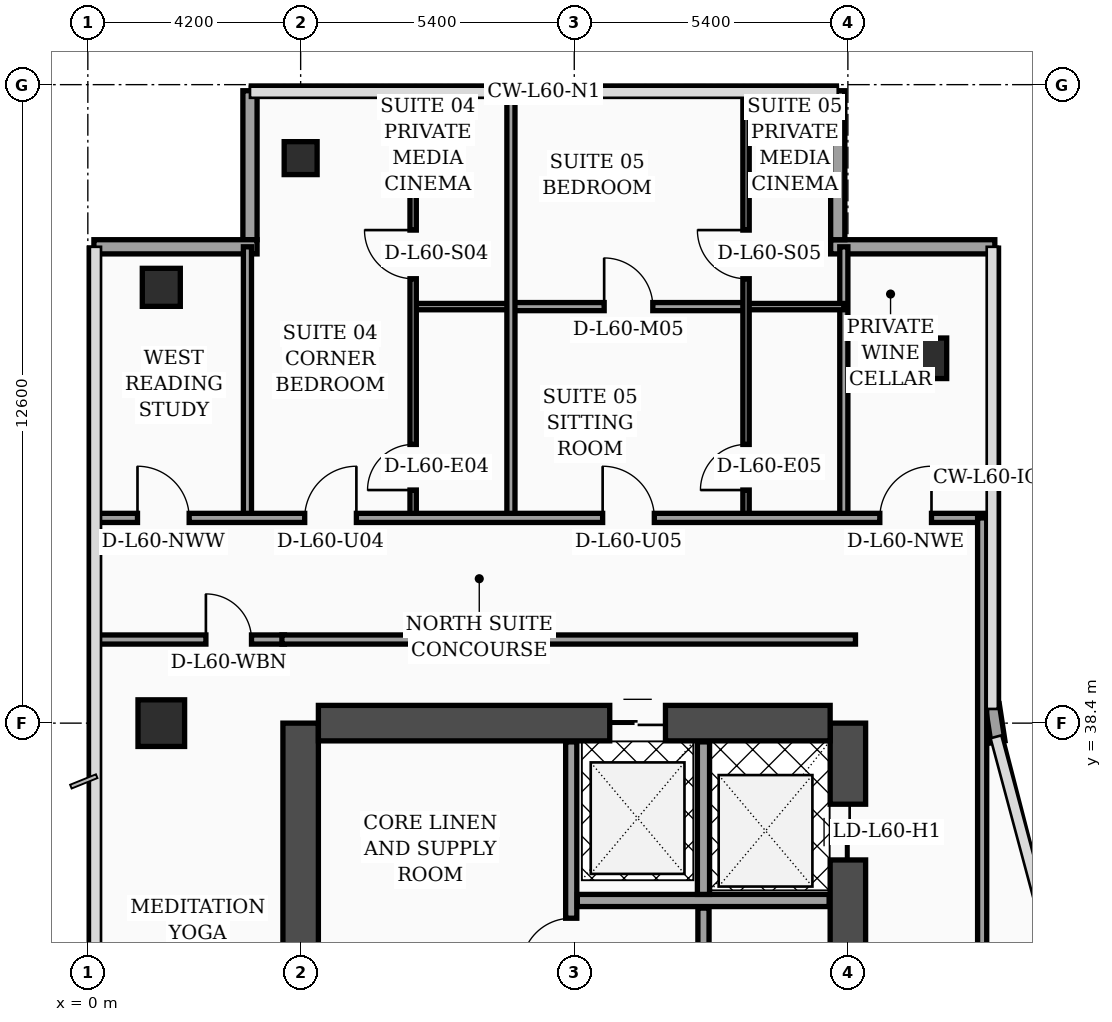
"""IFC4 building model, lengths in metres.
Left out: names, types, materials, properties, quantities, classifications, styles, units other than length and angle.
Written with IfcOpenShell. Run it as: python <this file> out.ifc"""

import sys

from ifc_helpers import new_model, si_unit, direction, frame, frame_2d, origin, origin_2d, place, context, subcontext, project, spatial, rectangle, hollow_rectangle, extrude, element, fill, save


model = new_model("IFC4")
c1 = context("Model", 3, precision=1e-05, world=origin(), true_north=direction((0.0, 1.0)))
c2 = subcontext(c1, "Body", "Model", "MODEL_VIEW")
j1 = project(units=[si_unit("LENGTHUNIT", "METRE"), si_unit("PLANEANGLEUNIT", "RADIAN")], contexts=[c1])
p1 = place(None, origin())
s1 = spatial("IfcSite", under=j1, at=p1, CompositionType="ELEMENT")
p2 = place(p1, origin())
s2 = spatial("IfcBuilding", under=s1, at=p2, CompositionType="ELEMENT")
p3 = place(p2, frame((0.0, 0.0, 243.8)))
s3 = spatial("IfcBuildingStorey", under=s2, at=p3, CompositionType="ELEMENT", Elevation=243.8)
p4 = place(p3, frame((4.2, 16.8, 0.0), z_axis=(0.0, 0.0, 1.0), x_axis=(0.0, 1.0, 0.0)))
e1 = element("IfcWall", 1, at=p4, inside=s3, PredefinedType="SHEAR", context=c2, shape_type="SweptSolid", body=[
    extrude(rectangle(XDim=21.6, YDim=0.7, at=frame_2d((10.8, 0.0))), origin(), (0.0, 0.0, 1.0), 3.56),
])
p5 = place(p3, frame((15.0, 16.8, 0.0), z_axis=(0.0, 0.0, 1.0), x_axis=(0.0, 1.0, 0.0)))
e2 = element("IfcWall", 2, at=p5, inside=s3, PredefinedType="SHEAR", context=c2, shape_type="SweptSolid", body=[
    extrude(rectangle(XDim=21.6, YDim=0.7, at=frame_2d((10.8, 0.0))), origin(), (0.0, 0.0, 1.0), 3.56),
])
p6 = place(p5, frame((8.65, 0.0, 0.0)))
e3 = element("IfcOpeningElement", 3, at=p6, cuts=e2, PredefinedType="OPENING", context=c2, shape_type="SweptSolid", body=[
    extrude(rectangle(XDim=1.1, YDim=2.2, at=frame_2d((0.55, 1.1))), frame((0.0, 0.36, 0.0), z_axis=(0.0, -1.0, 0.0), x_axis=(1.0, 0.0, 0.0)), (0.0, 0.0, 1.0), 0.72),
])
p7 = place(p5, frame((18.9, 0.0, 0.0)))
e4 = element("IfcOpeningElement", 4, at=p7, cuts=e2, PredefinedType="OPENING", context=c2, shape_type="SweptSolid", body=[
    extrude(rectangle(XDim=1.1, YDim=2.2, at=frame_2d((0.55, 1.1))), frame((0.0, 0.36, 0.0), z_axis=(0.0, -1.0, 0.0), x_axis=(1.0, 0.0, 0.0)), (0.0, 0.0, 1.0), 0.72),
])
p8 = place(p3, frame((4.55, 38.4, 0.0), z_axis=(0.0, 0.0, 1.0), x_axis=(1.0, 0.0, 0.0)))
e5 = element("IfcWall", 5, at=p8, inside=s3, PredefinedType="SHEAR", context=c2, shape_type="SweptSolid", body=[
    extrude(rectangle(XDim=10.1, YDim=0.7, at=frame_2d((5.05, 0.0))), origin(), (0.0, 0.0, 1.0), 3.56),
])
p9 = place(p8, frame((5.75, 0.0, 0.0)))
e6 = element("IfcOpeningElement", 6, at=p9, cuts=e5, PredefinedType="OPENING", context=c2, shape_type="SweptSolid", body=[
    extrude(rectangle(XDim=1.1, YDim=2.2, at=frame_2d((0.55, 1.1))), frame((0.0, 0.36, 0.0), z_axis=(0.0, -1.0, 0.0), x_axis=(1.0, 0.0, 0.0)), (0.0, 0.0, 1.0), 0.72),
])
p10 = place(p3, frame((1.45, 38.4, 0.0), z_axis=(0.0, 0.0, 1.0), x_axis=(1.0, 0.0, 0.0)))
e7 = element("IfcColumn", 7, at=p10, inside=s3, PredefinedType="COLUMN", context=c2, shape_type="SweptSolid", body=[
    extrude(rectangle(XDim=0.92, YDim=0.92, at=origin_2d()), origin(), (0.0, 0.0, 1.0), 3.56),
])
p11 = place(p3, frame((1.45, 47.0, 0.0), z_axis=(0.0, 0.0, 1.0), x_axis=(1.0, 0.0, 0.0)))
e8 = element("IfcColumn", 8, at=p11, inside=s3, PredefinedType="COLUMN", context=c2, shape_type="SweptSolid", body=[
    extrude(hollow_rectangle(XDim=0.75, YDim=0.75, WallThickness=0.032, at=origin_2d()), origin(), (0.0, 0.0, 1.0), 3.56),
])
p12 = place(p3, frame((4.2, 49.55, 0.0), z_axis=(0.0, 0.0, 1.0), x_axis=(1.0, 0.0, 0.0)))
e9 = element("IfcColumn", 9, at=p12, inside=s3, PredefinedType="COLUMN", context=c2, shape_type="SweptSolid", body=[
    extrude(hollow_rectangle(XDim=0.65, YDim=0.65, WallThickness=0.028, at=origin_2d()), origin(), (0.0, 0.0, 1.0), 3.56),
])
p13 = place(p3, frame((16.55, 45.6, 0.0), z_axis=(0.0, 0.0, 1.0), x_axis=(1.0, 0.0, 0.0)))
e10 = element("IfcColumn", 10, at=p13, inside=s3, PredefinedType="COLUMN", context=c2, shape_type="SweptSolid", body=[
    extrude(rectangle(XDim=0.8, YDim=0.8, at=origin_2d()), origin(), (0.0, 0.0, 1.0), 3.56),
])
p14 = place(p3, frame((17.962, 38.03, 0.0), z_axis=(0.0, 0.0, 1.0), x_axis=(-0.15141125477, 0.988470855377, 0.0)))
e11 = element("IfcWall", 11, at=p14, inside=s3, PredefinedType="SOLIDWALL", context=c2, shape_type="SweptSolid", body=[
    extrude(rectangle(XDim=0.739, YDim=0.28, at=frame_2d((0.369, 0.0))), origin(), (0.0, 0.0, 1.0), 3.56),
])
p15 = place(p3, frame((17.9, 47.8, 0.0), z_axis=(0.0, 0.0, 1.0), x_axis=(-1.0, 0.0, 0.0)))
e12 = element("IfcWall", 12, at=p15, inside=s3, PredefinedType="SOLIDWALL", context=c2, shape_type="SweptSolid", body=[
    extrude(rectangle(XDim=3.24, YDim=0.28, at=frame_2d((1.62, 0.0))), origin(), (0.0, 0.0, 1.0), 3.56),
])
p16 = place(p3, frame((14.8, 47.94, 0.0), z_axis=(0.0, 0.0, 1.0), x_axis=(0.0, 1.0, 0.0)))
e13 = element("IfcWall", 13, at=p16, inside=s3, PredefinedType="SOLIDWALL", context=c2, shape_type="SweptSolid", body=[
    extrude(rectangle(XDim=2.94, YDim=0.28, at=frame_2d((1.47, 0.0))), origin(), (0.0, 0.0, 1.0), 3.56),
])
p17 = place(p3, frame((3.2, 50.88, 0.0), z_axis=(0.0, 0.0, 1.0), x_axis=(0.0, -1.0, 0.0)))
e14 = element("IfcWall", 14, at=p17, inside=s3, PredefinedType="SOLIDWALL", context=c2, shape_type="SweptSolid", body=[
    extrude(rectangle(XDim=2.94, YDim=0.28, at=frame_2d((1.47, 0.0))), origin(), (0.0, 0.0, 1.0), 3.09),
])
p18 = place(p3, frame((3.34, 47.8, 0.0), z_axis=(0.0, 0.0, 1.0), x_axis=(-1.0, 0.0, 0.0)))
e15 = element("IfcWall", 15, at=p18, inside=s3, PredefinedType="SOLIDWALL", context=c2, shape_type="SweptSolid", body=[
    extrude(rectangle(XDim=3.22, YDim=0.28, at=frame_2d((1.61, 0.0))), origin(), (0.0, 0.0, 1.0), 3.09),
])
p19 = place(p3, frame((9.54, 32.92, 0.0), z_axis=(0.0, 0.0, 1.0), x_axis=(0.0, 1.0, 0.0)))
e16 = element("IfcWall", 16, at=p19, inside=s3, PredefinedType="SOLIDWALL", context=c2, shape_type="SweptSolid", body=[
    extrude(rectangle(XDim=5.11, YDim=0.22, at=frame_2d((2.555, 0.0))), origin(), (0.0, 0.0, 1.0), 3.56),
])
p20 = place(p19, frame((0.65, 0.0, 0.0)))
e17 = element("IfcOpeningElement", 17, at=p20, cuts=e16, PredefinedType="OPENING", context=c2, shape_type="SweptSolid", body=[
    extrude(rectangle(XDim=0.98, YDim=2.15, at=frame_2d((0.49, 1.075))), frame((0.0, 0.12, 0.0), z_axis=(0.0, -1.0, 0.0), x_axis=(1.0, 0.0, 0.0)), (0.0, 0.0, 1.0), 0.24),
])
p21 = place(p3, frame((12.15, 27.0, 0.0), z_axis=(0.0, 0.0, 1.0), x_axis=(0.0, 1.0, 0.0)))
e18 = element("IfcWall", 18, at=p21, inside=s3, PredefinedType="SOLIDWALL", context=c2, shape_type="SweptSolid", body=[
    extrude(rectangle(XDim=7.75, YDim=0.22, at=frame_2d((3.875, 0.0))), origin(), (0.0, 0.0, 1.0), 3.56),
])
p22 = place(p21, frame((0.8, 0.0, 0.0)))
e19 = element("IfcOpeningElement", 19, at=p22, cuts=e18, PredefinedType="OPENING", context=c2, shape_type="SweptSolid", body=[
    extrude(rectangle(XDim=0.98, YDim=2.15, at=frame_2d((0.49, 1.075))), frame((0.0, 0.12, 0.0), z_axis=(0.0, -1.0, 0.0), x_axis=(1.0, 0.0, 0.0)), (0.0, 0.0, 1.0), 0.24),
])
p23 = place(p3, frame((9.66, 34.9, 0.0), z_axis=(0.0, 0.0, 1.0), x_axis=(1.0, 0.0, 0.0)))
e20 = element("IfcWall", 20, at=p23, inside=s3, PredefinedType="SOLIDWALL", context=c2, shape_type="SweptSolid", body=[
    extrude(rectangle(XDim=4.97, YDim=0.24, at=frame_2d((2.485, 0.0))), origin(), (0.0, 0.0, 1.0), 3.56),
])
p24 = place(p3, frame((12.15, 35.02, 0.0), z_axis=(0.0, 0.0, 1.0), x_axis=(0.0, 1.0, 0.0)))
e21 = element("IfcWall", 21, at=p24, inside=s3, PredefinedType="SOLIDWALL", context=c2, shape_type="SweptSolid", body=[
    extrude(rectangle(XDim=3.01, YDim=0.24, at=frame_2d((1.505, 0.0))), origin(), (0.0, 0.0, 1.0), 3.56),
])
p25 = place(p3, frame((0.08, 40.05, 0.0), z_axis=(0.0, 0.0, 1.0), x_axis=(1.0, 0.0, 0.0)))
e22 = element("IfcWall", 22, at=p25, inside=s3, PredefinedType="PARTITIONING", context=c2, shape_type="SweptSolid", body=[
    extrude(rectangle(XDim=3.8, YDim=0.18, at=frame_2d((1.9, 0.0))), origin(), (0.0, 0.0, 1.0), 2.99),
])
p26 = place(p25, frame((2.25, 0.0, 0.0)))
e23 = element("IfcOpeningElement", 23, at=p26, cuts=e22, PredefinedType="OPENING", context=c2, shape_type="SweptSolid", body=[
    extrude(rectangle(XDim=0.9, YDim=2.15, at=frame_2d((0.45, 1.075))), frame((0.0, 0.1, 0.0), z_axis=(0.0, -1.0, 0.0), x_axis=(1.0, 0.0, 0.0)), (0.0, 0.0, 1.0), 0.2),
])
p27 = place(p3, frame((3.15, 42.45, 0.0), z_axis=(0.0, 0.0, 1.0), x_axis=(0.0, 1.0, 0.0)))
e24 = element("IfcWall", 24, at=p27, inside=s3, PredefinedType="PARTITIONING", context=c2, shape_type="SweptSolid", body=[
    extrude(rectangle(XDim=5.35, YDim=0.16, at=frame_2d((2.675, 0.0))), origin(), (0.0, 0.0, 1.0), 3.14),
])
p28 = place(p3, frame((14.92, 42.45, 0.0), z_axis=(0.0, 0.0, 1.0), x_axis=(0.0, 1.0, 0.0)))
e25 = element("IfcWall", 25, at=p28, inside=s3, PredefinedType="PARTITIONING", context=c2, shape_type="SweptSolid", body=[
    extrude(rectangle(XDim=5.35, YDim=0.16, at=frame_2d((2.675, 0.0))), origin(), (0.0, 0.0, 1.0), 3.09),
])
p29 = place(p3, frame((6.42, 46.62, 0.0), z_axis=(0.0, 0.0, 1.0), x_axis=(1.0, 0.0, 0.0)))
e26 = element("IfcWall", 26, at=p29, inside=s3, PredefinedType="PARTITIONING", context=c2, shape_type="SweptSolid", body=[
    extrude(rectangle(XDim=1.93, YDim=0.125, at=frame_2d((0.965, 0.0))), origin(), (0.0, 0.0, 1.0), 3.56),
])
p30 = place(p3, frame((6.42, 42.45, 0.0), z_axis=(0.0, 0.0, 1.0), x_axis=(0.0, 1.0, 0.0)))
e27 = element("IfcWall", 27, at=p30, inside=s3, PredefinedType="PARTITIONING", context=c2, shape_type="SweptSolid", body=[
    extrude(rectangle(XDim=8.49, YDim=0.125, at=frame_2d((4.245, 0.0))), origin(), (0.0, 0.0, 1.0), 3.09),
])
p31 = place(p30, frame((0.55, 0.0, 0.0)))
e28 = element("IfcOpeningElement", 28, at=p31, cuts=e27, PredefinedType="OPENING", context=c2, shape_type="SweptSolid", body=[
    extrude(rectangle(XDim=0.9, YDim=2.15, at=frame_2d((0.45, 1.075))), frame((0.0, 0.073, 0.0), z_axis=(0.0, -1.0, 0.0), x_axis=(1.0, 0.0, 0.0)), (0.0, 0.0, 1.0), 0.145),
])
p32 = place(p30, frame((4.72, 0.0, 0.0)))
e29 = element("IfcOpeningElement", 29, at=p32, cuts=e27, PredefinedType="OPENING", context=c2, shape_type="SweptSolid", body=[
    extrude(rectangle(XDim=0.96, YDim=2.2, at=frame_2d((0.48, 1.1))), frame((0.0, 0.073, 0.0), z_axis=(0.0, -1.0, 0.0), x_axis=(1.0, 0.0, 0.0)), (0.0, 0.0, 1.0), 0.145),
])
p33 = place(p3, frame((12.99, 46.62, 0.0), z_axis=(0.0, 0.0, 1.0), x_axis=(1.0, 0.0, 0.0)))
e30 = element("IfcWall", 30, at=p33, inside=s3, PredefinedType="PARTITIONING", context=c2, shape_type="SweptSolid", body=[
    extrude(rectangle(XDim=1.93, YDim=0.125, at=frame_2d((0.965, 0.0))), origin(), (0.0, 0.0, 1.0), 3.09),
])
p34 = place(p3, frame((8.35, 46.62, 0.0), z_axis=(0.0, 0.0, 1.0), x_axis=(1.0, 0.0, 0.0)))
e31 = element("IfcWall", 31, at=p34, inside=s3, PredefinedType="PARTITIONING", context=c2, shape_type="SweptSolid", body=[
    extrude(rectangle(XDim=4.64, YDim=0.16, at=frame_2d((2.32, 0.0))), origin(), (0.0, 0.0, 1.0), 3.09),
])
p35 = place(p34, frame((1.84, 0.0, 0.0)))
e32 = element("IfcOpeningElement", 32, at=p35, cuts=e31, PredefinedType="OPENING", context=c2, shape_type="SweptSolid", body=[
    extrude(rectangle(XDim=0.96, YDim=2.2, at=frame_2d((0.48, 1.1))), frame((0.0, 0.09, 0.0), z_axis=(0.0, -1.0, 0.0), x_axis=(1.0, 0.0, 0.0)), (0.0, 0.0, 1.0), 0.18),
])
p36 = place(p3, frame((12.99, 42.45, 0.0), z_axis=(0.0, 0.0, 1.0), x_axis=(0.0, 1.0, 0.0)))
e33 = element("IfcWall", 33, at=p36, inside=s3, PredefinedType="PARTITIONING", context=c2, shape_type="SweptSolid", body=[
    extrude(rectangle(XDim=8.49, YDim=0.125, at=frame_2d((4.245, 0.0))), origin(), (0.0, 0.0, 1.0), 3.09),
])
p37 = place(p36, frame((0.55, 0.0, 0.0)))
e34 = element("IfcOpeningElement", 34, at=p37, cuts=e33, PredefinedType="OPENING", context=c2, shape_type="SweptSolid", body=[
    extrude(rectangle(XDim=0.9, YDim=2.15, at=frame_2d((0.45, 1.075))), frame((0.0, 0.073, 0.0), z_axis=(0.0, -1.0, 0.0), x_axis=(1.0, 0.0, 0.0)), (0.0, 0.0, 1.0), 0.145),
])
p38 = place(p36, frame((4.72, 0.0, 0.0)))
e35 = element("IfcOpeningElement", 35, at=p38, cuts=e33, PredefinedType="OPENING", context=c2, shape_type="SweptSolid", body=[
    extrude(rectangle(XDim=0.96, YDim=2.2, at=frame_2d((0.48, 1.1))), frame((0.0, 0.073, 0.0), z_axis=(0.0, -1.0, 0.0), x_axis=(1.0, 0.0, 0.0)), (0.0, 0.0, 1.0), 0.145),
])
p39 = place(p3, frame((8.35, 42.45, 0.0), z_axis=(0.0, 0.0, 1.0), x_axis=(0.0, 1.0, 0.0)))
e36 = element("IfcWall", 36, at=p39, inside=s3, PredefinedType="PARTITIONING", context=c2, shape_type="SweptSolid", body=[
    extrude(rectangle(XDim=8.49, YDim=0.16, at=frame_2d((4.245, 0.0))), origin(), (0.0, 0.0, 1.0), 3.09),
])
p40 = place(p3, frame((0.08, 42.45, 0.0), z_axis=(0.0, 0.0, 1.0), x_axis=(1.0, 0.0, 0.0)))
e37 = element("IfcWall", 37, at=p40, inside=s3, PredefinedType="PARTITIONING", context=c2, shape_type="SweptSolid", body=[
    extrude(rectangle(XDim=17.77, YDim=0.18, at=frame_2d((8.885, 0.0))), origin(), (0.0, 0.0, 1.0), 2.99),
])
p41 = place(p40, frame((0.9, 0.0, 0.0)))
e38 = element("IfcOpeningElement", 38, at=p41, cuts=e37, PredefinedType="OPENING", context=c2, shape_type="SweptSolid", body=[
    extrude(rectangle(XDim=1.02, YDim=2.2, at=frame_2d((0.51, 1.1))), frame((0.0, 0.1, 0.0), z_axis=(0.0, -1.0, 0.0), x_axis=(1.0, 0.0, 0.0)), (0.0, 0.0, 1.0), 0.2),
])
p42 = place(p40, frame((4.2, 0.0, 0.0)))
e39 = element("IfcOpeningElement", 39, at=p42, cuts=e37, PredefinedType="OPENING", context=c2, shape_type="SweptSolid", body=[
    extrude(rectangle(XDim=1.02, YDim=2.2, at=frame_2d((0.51, 1.1))), frame((0.0, 0.1, 0.0), z_axis=(0.0, -1.0, 0.0), x_axis=(1.0, 0.0, 0.0)), (0.0, 0.0, 1.0), 0.2),
])
p43 = place(p40, frame((10.08, 0.0, 0.0)))
e40 = element("IfcOpeningElement", 40, at=p43, cuts=e37, PredefinedType="OPENING", context=c2, shape_type="SweptSolid", body=[
    extrude(rectangle(XDim=1.02, YDim=2.2, at=frame_2d((0.51, 1.1))), frame((0.0, 0.1, 0.0), z_axis=(0.0, -1.0, 0.0), x_axis=(1.0, 0.0, 0.0)), (0.0, 0.0, 1.0), 0.2),
])
p44 = place(p40, frame((15.55, 0.0, 0.0)))
e41 = element("IfcOpeningElement", 41, at=p44, cuts=e37, PredefinedType="OPENING", context=c2, shape_type="SweptSolid", body=[
    extrude(rectangle(XDim=1.02, YDim=2.2, at=frame_2d((0.51, 1.1))), frame((0.0, 0.1, 0.0), z_axis=(0.0, -1.0, 0.0), x_axis=(1.0, 0.0, 0.0)), (0.0, 0.0, 1.0), 0.2),
])
p45 = place(p3, frame((17.65, 24.3, 0.0), z_axis=(0.0, 0.0, 1.0), x_axis=(0.0, 1.0, 0.0)))
e42 = element("IfcWall", 42, at=p45, inside=s3, PredefinedType="PARTITIONING", context=c2, shape_type="SweptSolid", body=[
    extrude(rectangle(XDim=18.15, YDim=0.18, at=frame_2d((9.075, 0.0))), origin(), (0.0, 0.0, 1.0), 2.99),
])
p46 = place(p45, frame((3.2, 0.0, 0.0)))
e43 = element("IfcOpeningElement", 43, at=p46, cuts=e42, PredefinedType="OPENING", context=c2, shape_type="SweptSolid", body=[
    extrude(rectangle(XDim=1.02, YDim=2.2, at=frame_2d((0.51, 1.1))), frame((0.0, 0.1, 0.0), z_axis=(0.0, -1.0, 0.0), x_axis=(1.0, 0.0, 0.0)), (0.0, 0.0, 1.0), 0.2),
])
p47 = place(p3, frame((3.83, 40.05, 0.0), z_axis=(0.0, 0.0, 1.0), x_axis=(1.0, 0.0, 0.0)))
e44 = element("IfcWall", 44, at=p47, inside=s3, PredefinedType="PARTITIONING", context=c2, shape_type="SweptSolid", body=[
    extrude(rectangle(XDim=11.32, YDim=0.18, at=frame_2d((5.66, 0.0))), origin(), (0.0, 0.0, 1.0), 2.99),
])
p48 = place(p20, origin())
e45 = element("IfcDoor", 45, at=p48, inside=s3, OperationType="SINGLE_SWING_LEFT", PredefinedType="DOOR", context=c2, shape_type="SweptSolid", body=[
    extrude(rectangle(XDim=0.98, YDim=2.15, at=frame_2d((0.49, 1.075))), frame((0.0, 0.025, 0.0), z_axis=(0.0, -1.0, 0.0), x_axis=(1.0, 0.0, 0.0)), (0.0, 0.0, 1.0), 0.05),
])
fill(e17, e45)
p49 = place(p26, origin())
e46 = element("IfcDoor", 46, at=p49, inside=s3, OperationType="SINGLE_SWING_LEFT", PredefinedType="DOOR", context=c2, shape_type="SweptSolid", body=[
    extrude(rectangle(XDim=0.9, YDim=2.15, at=frame_2d((0.45, 1.075))), frame((0.0, 0.025, 0.0), z_axis=(0.0, -1.0, 0.0), x_axis=(1.0, 0.0, 0.0)), (0.0, 0.0, 1.0), 0.05),
])
fill(e23, e46)
p50 = place(p31, origin())
e47 = element("IfcDoor", 47, at=p50, inside=s3, OperationType="SINGLE_SWING_LEFT", PredefinedType="DOOR", context=c2, shape_type="SweptSolid", body=[
    extrude(rectangle(XDim=0.9, YDim=2.15, at=frame_2d((0.45, 1.075))), frame((0.0, 0.025, 0.0), z_axis=(0.0, -1.0, 0.0), x_axis=(1.0, 0.0, 0.0)), (0.0, 0.0, 1.0), 0.05),
])
fill(e28, e47)
p51 = place(p32, origin())
e48 = element("IfcDoor", 48, at=p51, inside=s3, OperationType="SINGLE_SWING_RIGHT", PredefinedType="DOOR", context=c2, shape_type="SweptSolid", body=[
    extrude(rectangle(XDim=0.96, YDim=2.2, at=frame_2d((0.48, 1.1))), frame((0.0, 0.025, 0.0), z_axis=(0.0, -1.0, 0.0), x_axis=(1.0, 0.0, 0.0)), (0.0, 0.0, 1.0), 0.05),
])
fill(e29, e48)
p52 = place(p35, origin())
e49 = element("IfcDoor", 49, at=p52, inside=s3, OperationType="SINGLE_SWING_LEFT", PredefinedType="DOOR", context=c2, shape_type="SweptSolid", body=[
    extrude(rectangle(XDim=0.96, YDim=2.2, at=frame_2d((0.48, 1.1))), frame((0.0, 0.025, 0.0), z_axis=(0.0, -1.0, 0.0), x_axis=(1.0, 0.0, 0.0)), (0.0, 0.0, 1.0), 0.05),
])
fill(e32, e49)
p53 = place(p37, origin())
e50 = element("IfcDoor", 50, at=p53, inside=s3, OperationType="SINGLE_SWING_LEFT", PredefinedType="DOOR", context=c2, shape_type="SweptSolid", body=[
    extrude(rectangle(XDim=0.9, YDim=2.15, at=frame_2d((0.45, 1.075))), frame((0.0, 0.025, 0.0), z_axis=(0.0, -1.0, 0.0), x_axis=(1.0, 0.0, 0.0)), (0.0, 0.0, 1.0), 0.05),
])
fill(e34, e50)
p54 = place(p38, origin())
e51 = element("IfcDoor", 51, at=p54, inside=s3, OperationType="SINGLE_SWING_RIGHT", PredefinedType="DOOR", context=c2, shape_type="SweptSolid", body=[
    extrude(rectangle(XDim=0.96, YDim=2.2, at=frame_2d((0.48, 1.1))), frame((0.0, 0.025, 0.0), z_axis=(0.0, -1.0, 0.0), x_axis=(1.0, 0.0, 0.0)), (0.0, 0.0, 1.0), 0.05),
])
fill(e35, e51)
p55 = place(p41, origin())
e52 = element("IfcDoor", 52, at=p55, inside=s3, OperationType="SINGLE_SWING_LEFT", PredefinedType="DOOR", context=c2, shape_type="SweptSolid", body=[
    extrude(rectangle(XDim=1.02, YDim=2.2, at=frame_2d((0.51, 1.1))), frame((0.0, 0.025, 0.0), z_axis=(0.0, -1.0, 0.0), x_axis=(1.0, 0.0, 0.0)), (0.0, 0.0, 1.0), 0.05),
])
fill(e38, e52)
p56 = place(p42, origin())
e53 = element("IfcDoor", 53, at=p56, inside=s3, OperationType="SINGLE_SWING_RIGHT", PredefinedType="DOOR", context=c2, shape_type="SweptSolid", body=[
    extrude(rectangle(XDim=1.02, YDim=2.2, at=frame_2d((0.51, 1.1))), frame((0.0, 0.025, 0.0), z_axis=(0.0, -1.0, 0.0), x_axis=(1.0, 0.0, 0.0)), (0.0, 0.0, 1.0), 0.05),
])
fill(e39, e53)
p57 = place(p43, origin())
e54 = element("IfcDoor", 54, at=p57, inside=s3, OperationType="SINGLE_SWING_LEFT", PredefinedType="DOOR", context=c2, shape_type="SweptSolid", body=[
    extrude(rectangle(XDim=1.02, YDim=2.2, at=frame_2d((0.51, 1.1))), frame((0.0, 0.025, 0.0), z_axis=(0.0, -1.0, 0.0), x_axis=(1.0, 0.0, 0.0)), (0.0, 0.0, 1.0), 0.05),
])
fill(e40, e54)
p58 = place(p44, origin())
e55 = element("IfcDoor", 55, at=p58, inside=s3, OperationType="SINGLE_SWING_RIGHT", PredefinedType="DOOR", context=c2, shape_type="SweptSolid", body=[
    extrude(rectangle(XDim=1.02, YDim=2.2, at=frame_2d((0.51, 1.1))), frame((0.0, 0.025, 0.0), z_axis=(0.0, -1.0, 0.0), x_axis=(1.0, 0.0, 0.0)), (0.0, 0.0, 1.0), 0.05),
])
fill(e41, e55)
p59 = place(p7, origin())
e56 = element("IfcDoor", 56, at=p59, inside=s3, OperationType="DOUBLE_DOOR_SLIDING", PredefinedType="DOOR", context=c2, shape_type="SweptSolid", body=[
    extrude(rectangle(XDim=1.1, YDim=2.2, at=frame_2d((0.55, 1.1))), frame((0.0, 0.025, 0.0), z_axis=(0.0, -1.0, 0.0), x_axis=(1.0, 0.0, 0.0)), (0.0, 0.0, 1.0), 0.05),
])
fill(e4, e56)
p60 = place(p9, origin())
e57 = element("IfcDoor", 57, at=p60, inside=s3, OperationType="DOUBLE_DOOR_SLIDING", PredefinedType="DOOR", context=c2, shape_type="SweptSolid", body=[
    extrude(rectangle(XDim=1.1, YDim=2.2, at=frame_2d((0.55, 1.1))), frame((0.0, 0.025, 0.0), z_axis=(0.0, -1.0, 0.0), x_axis=(1.0, 0.0, 0.0)), (0.0, 0.0, 1.0), 0.05),
])
fill(e6, e57)
save(model, sys.argv[1])
